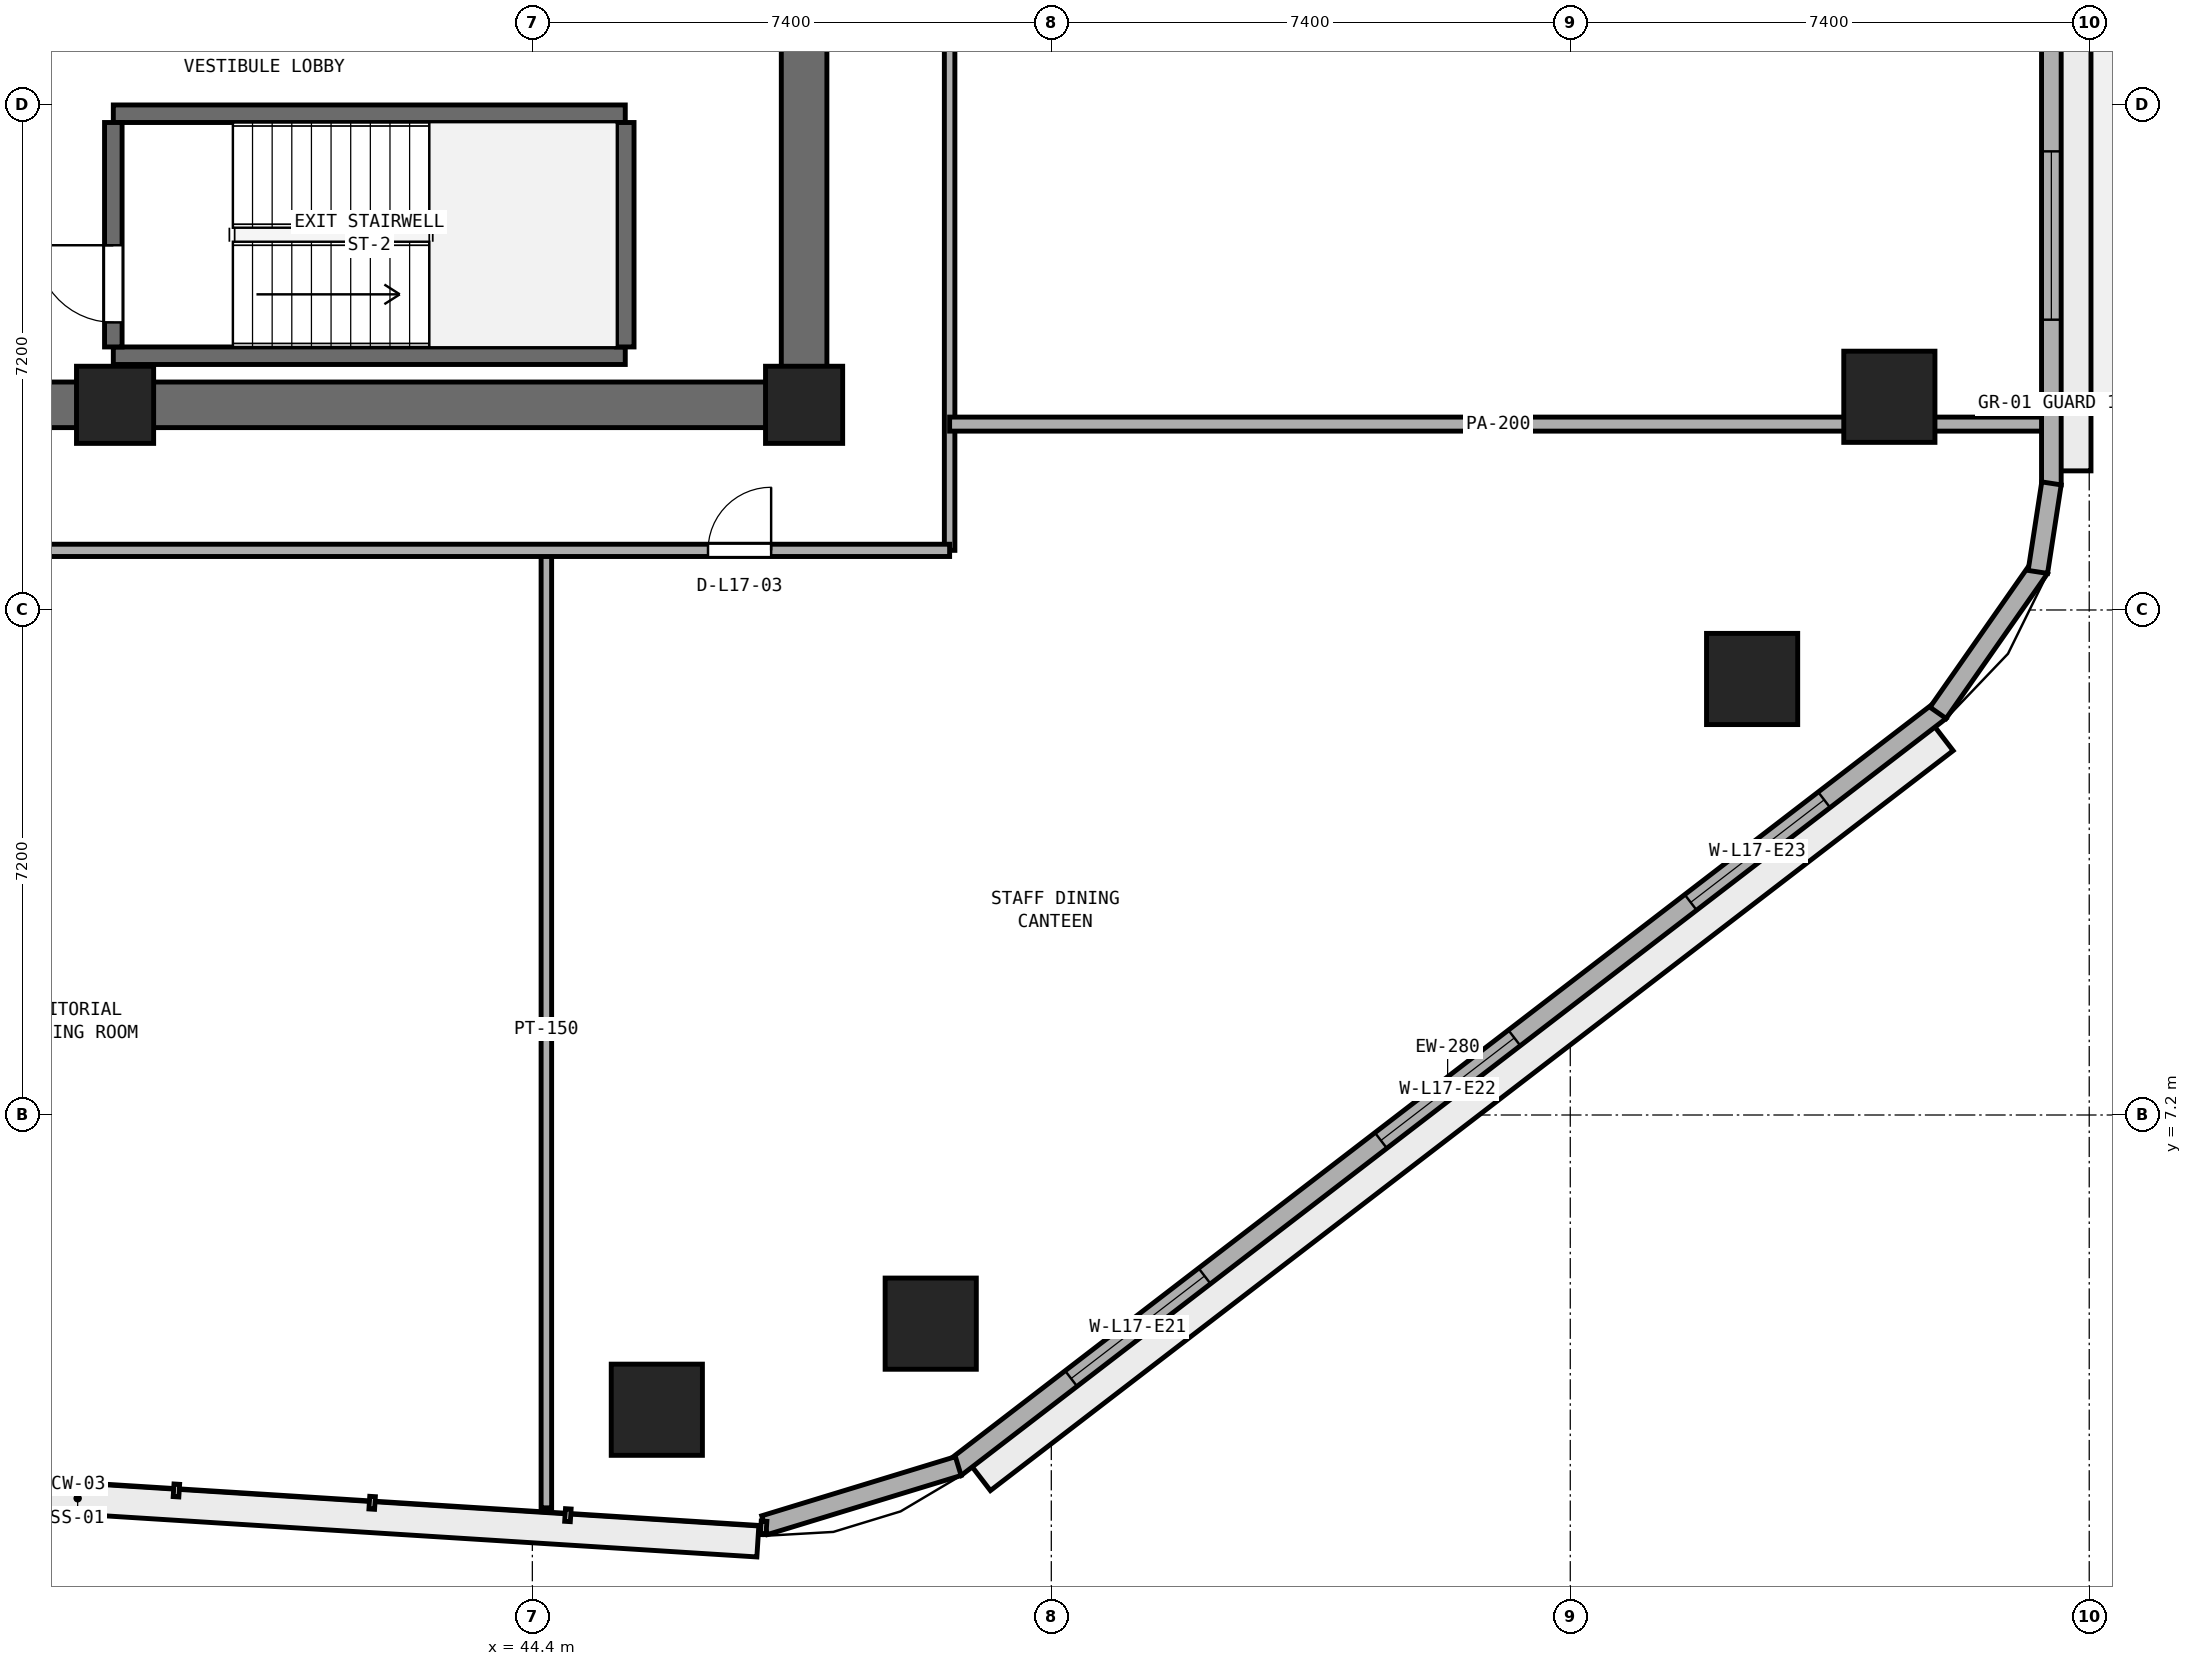
"""IFC4 building model, lengths in metres.
Left out: names, types, materials, properties, quantities, classifications, styles, units other than length and angle.
Written with IfcOpenShell. Run it as: python <this file> out.ifc"""

import sys

from ifc_helpers import new_model, si_unit, direction, frame, frame_2d, origin, origin_2d, place, context, subcontext, project, spatial, rectangle, extrude, element, fill, save


model = new_model("IFC4")
c1 = context("Model", 3, precision=1e-05, world=origin(), true_north=direction((0.0, 1.0)))
c2 = subcontext(c1, "Body", "Model", "MODEL_VIEW")
j1 = project(units=[si_unit("LENGTHUNIT", "METRE"), si_unit("PLANEANGLEUNIT", "RADIAN")], contexts=[c1])
p1 = place(None, origin())
s1 = spatial("IfcSite", under=j1, at=p1, CompositionType="ELEMENT")
p2 = place(p1, origin())
s2 = spatial("IfcBuilding", under=s1, at=p2, CompositionType="ELEMENT")
p3 = place(p2, frame((0.0, 0.0, 70.6)))
s3 = spatial("IfcBuildingStorey", under=s2, at=p3, CompositionType="ELEMENT", Elevation=70.6)
p4 = place(p3, frame((25.4, 17.325, 0.0), z_axis=(0.0, 0.0, 1.0), x_axis=(1.0, 0.0, 0.0)))
e1 = element("IfcWall", 1, at=p4, inside=s3, PredefinedType="SHEAR", context=c2, shape_type="SweptSolid", body=[
    extrude(rectangle(XDim=23.2, YDim=0.65, at=frame_2d((11.6, 0.0))), origin(), (0.0, 0.0, 1.0), 3.525),
])
p5 = place(p3, frame((48.275, 17.65, 0.0), z_axis=(0.0, 0.0, 1.0), x_axis=(0.0, 1.0, 0.0)))
e2 = element("IfcWall", 2, at=p5, inside=s3, PredefinedType="SHEAR", context=c2, shape_type="SweptSolid", body=[
    extrude(rectangle(XDim=15.1, YDim=0.65, at=frame_2d((7.55, 0.0))), origin(), (0.0, 0.0, 1.0), 3.525),
])
p6 = place(p5, frame((5.65, 0.0, 0.0)))
e3 = element("IfcOpeningElement", 3, at=p6, cuts=e2, PredefinedType="OPENING", context=c2, shape_type="SweptSolid", body=[
    extrude(rectangle(XDim=1.5, YDim=2.15, at=frame_2d((0.75, 1.075))), frame((0.0, 0.335, 0.0), z_axis=(0.0, -1.0, 0.0), x_axis=(1.0, 0.0, 0.0)), (0.0, 0.0, 1.0), 0.67),
])
for number, where, z_axis, x_axis in (
    (4, (38.45, 17.325, 0.0), (0.0, 0.0, 1.0), (1.0, 0.0, 0.0)),
    (5, (48.275, 17.325, 0.0), (0.0, 0.0, 1.0), (1.0, 0.0, 0.0)),
):
    element("IfcColumn", number, at=place(p3, frame(where, z_axis=z_axis, x_axis=x_axis)), inside=s3, PredefinedType="PILASTER", context=c2, shape_type="SweptSolid", body=[
        extrude(rectangle(XDim=1.1, YDim=1.1, at=origin_2d()), origin(), (0.0, 0.0, 1.0), 3.8),
    ])
for number, where, z_axis, x_axis in (
    (6, (46.175, 2.998, 0.0), (0.0, 0.0, 1.0), (1.0, 0.0, 0.0)),
    (7, (50.081, 4.225, 0.0), (0.0, 0.0, 1.0), (1.0, 0.0, 0.0)),
    (8, (61.793, 13.416, 0.0), (0.0, 0.0, 1.0), (1.0, 0.0, 0.0)),
    (9, (63.75, 17.44, 0.0), (0.0, 0.0, 1.0), (1.0, 0.0, 0.0)),
):
    element("IfcColumn", number, at=place(p3, frame(where, z_axis=z_axis, x_axis=x_axis)), inside=s3, PredefinedType="COLUMN", context=c2, shape_type="SweptSolid", body=[
        extrude(rectangle(XDim=1.3, YDim=1.3, at=origin_2d()), origin(), (0.0, 0.0, 1.0), 3.8),
    ])
for number, where, z_axis, x_axis in (
    (10, (38.425, 18.025, 0.0), (0.0, 0.0, 1.0), (1.0, 0.0, 0.0)),
    (11, (38.425, 21.475, 0.0), (0.0, 0.0, 1.0), (1.0, 0.0, 0.0)),
):
    element("IfcWall", number, at=place(p3, frame(where, z_axis=z_axis, x_axis=x_axis)), inside=s3, PredefinedType="SHEAR", context=c2, shape_type="SweptSolid", body=[
        extrude(rectangle(XDim=7.3, YDim=0.25, at=frame_2d((3.65, 0.0))), origin(), (0.0, 0.0, 1.0), 3.525),
    ])
p7 = place(p3, frame((38.425, 18.15, 0.0), z_axis=(0.0, 0.0, 1.0), x_axis=(0.0, 1.0, 0.0)))
e12 = element("IfcWall", 12, at=p7, inside=s3, PredefinedType="SHEAR", context=c2, shape_type="SweptSolid", body=[
    extrude(rectangle(XDim=3.2, YDim=0.25, at=frame_2d((1.6, 0.0))), origin(), (0.0, 0.0, 1.0), 3.525),
])
p8 = place(p7, frame((0.35, 0.0, 0.0)))
e13 = element("IfcOpeningElement", 13, at=p8, cuts=e12, PredefinedType="OPENING", context=c2, shape_type="SweptSolid", body=[
    extrude(rectangle(XDim=1.1, YDim=2.15, at=frame_2d((0.55, 1.075))), frame((0.0, 0.135, 0.0), z_axis=(0.0, -1.0, 0.0), x_axis=(1.0, 0.0, 0.0)), (0.0, 0.0, 1.0), 0.27),
])
p9 = place(p3, frame((45.725, 18.15, 0.0), z_axis=(0.0, 0.0, 1.0), x_axis=(0.0, 1.0, 0.0)))
e14 = element("IfcWall", 14, at=p9, inside=s3, PredefinedType="SHEAR", context=c2, shape_type="SweptSolid", body=[
    extrude(rectangle(XDim=3.2, YDim=0.25, at=frame_2d((1.6, 0.0))), origin(), (0.0, 0.0, 1.0), 3.525),
])
p10 = place(p3, frame((50.35, 15.25, 0.0), z_axis=(0.0, 0.0, 1.0), x_axis=(0.0, 1.0, 0.0)))
e15 = element("IfcWall", 15, at=p10, inside=s3, PredefinedType="PARTITIONING", context=c2, shape_type="SweptSolid", body=[
    extrude(rectangle(XDim=19.9, YDim=0.15, at=frame_2d((9.95, 0.0))), origin(), (0.0, 0.0, 1.0), 3.525),
])
p11 = place(p10, frame((7.825, 0.0, 0.0)))
e16 = element("IfcOpeningElement", 16, at=p11, cuts=e15, PredefinedType="OPENING", context=c2, shape_type="SweptSolid", body=[
    extrude(rectangle(XDim=0.9, YDim=2.1, at=frame_2d((0.45, 1.05))), frame((0.0, 0.085, 0.0), z_axis=(0.0, -1.0, 0.0), x_axis=(1.0, 0.0, 0.0)), (0.0, 0.0, 1.0), 0.17),
])
p12 = place(p10, frame((15.925, 0.0, 0.0)))
e17 = element("IfcOpeningElement", 17, at=p12, cuts=e15, PredefinedType="OPENING", context=c2, shape_type="SweptSolid", body=[
    extrude(rectangle(XDim=1.0, YDim=2.12, at=frame_2d((0.5, 1.06))), frame((0.0, 0.085, 0.0), z_axis=(0.0, -1.0, 0.0), x_axis=(1.0, 0.0, 0.0)), (0.0, 0.0, 1.0), 0.17),
])
p13 = place(p3, frame((44.6, 1.599, 0.0), z_axis=(0.0, 0.0, 1.0), x_axis=(0.0, 1.0, 0.0)))
e18 = element("IfcWall", 18, at=p13, inside=s3, PredefinedType="PARTITIONING", context=c2, shape_type="SweptSolid", body=[
    extrude(rectangle(XDim=13.651, YDim=0.15, at=frame_2d((6.825, 0.0))), origin(), (0.0, 0.0, 1.0), 3.525),
])
p14 = place(p3, frame((23.65, 15.25, 0.0), z_axis=(0.0, 0.0, 1.0), x_axis=(1.0, 0.0, 0.0)))
e19 = element("IfcWall", 19, at=p14, inside=s3, PredefinedType="PARTITIONING", context=c2, shape_type="SweptSolid", body=[
    extrude(rectangle(XDim=26.7, YDim=0.175, at=frame_2d((13.35, 0.0))), origin(), (0.0, 0.0, 1.0), 3.525),
])
p15 = place(p14, frame((10.145, 0.0, 0.0)))
e20 = element("IfcOpeningElement", 20, at=p15, cuts=e19, PredefinedType="OPENING", context=c2, shape_type="SweptSolid", body=[
    extrude(rectangle(XDim=0.9, YDim=2.1, at=frame_2d((0.45, 1.05))), frame((0.0, 0.097, 0.0), z_axis=(0.0, -1.0, 0.0), x_axis=(1.0, 0.0, 0.0)), (0.0, 0.0, 1.0), 0.195),
])
p16 = place(p14, frame((23.255, 0.0, 0.0)))
e21 = element("IfcOpeningElement", 21, at=p16, cuts=e19, PredefinedType="OPENING", context=c2, shape_type="SweptSolid", body=[
    extrude(rectangle(XDim=0.9, YDim=2.1, at=frame_2d((0.45, 1.05))), frame((0.0, 0.097, 0.0), z_axis=(0.0, -1.0, 0.0), x_axis=(1.0, 0.0, 0.0)), (0.0, 0.0, 1.0), 0.195),
])
p17 = place(p3, frame((50.35, 17.05, 0.0), z_axis=(0.0, 0.0, 1.0), x_axis=(1.0, 0.0, 0.0)))
e22 = element("IfcWall", 22, at=p17, inside=s3, PredefinedType="PARTITIONING", context=c2, shape_type="SweptSolid", body=[
    extrude(rectangle(XDim=15.645, YDim=0.2, at=frame_2d((7.823, 0.0))), origin(), (0.0, 0.0, 1.0), 3.525),
])
p18 = place(p3, frame((50.429, 2.172, 0.0), z_axis=(0.0, 0.0, 1.0), x_axis=(0.792937466367, 0.609303023488, 0.0)))
e23 = element("IfcWall", 23, at=p18, inside=s3, PredefinedType="STANDARD", context=c2, shape_type="SweptSolid", body=[
    extrude(rectangle(XDim=17.713, YDim=0.28, at=frame_2d((8.856, 0.0))), origin(), (0.0, 0.0, 1.0), 3.525),
])
p19 = place(p18, frame((2.085, 0.0, 0.9)))
e24 = element("IfcOpeningElement", 24, at=p19, cuts=e23, PredefinedType="OPENING", context=c2, shape_type="SweptSolid", body=[
    extrude(rectangle(XDim=2.4, YDim=1.75, at=frame_2d((1.2, 0.875))), frame((0.0, 0.15, 0.0), z_axis=(0.0, -1.0, 0.0), x_axis=(1.0, 0.0, 0.0)), (0.0, 0.0, 1.0), 0.3),
])
p20 = place(p18, frame((7.656, 0.0, 0.9)))
e25 = element("IfcOpeningElement", 25, at=p20, cuts=e23, PredefinedType="OPENING", context=c2, shape_type="SweptSolid", body=[
    extrude(rectangle(XDim=2.4, YDim=1.75, at=frame_2d((1.2, 0.875))), frame((0.0, 0.15, 0.0), z_axis=(0.0, -1.0, 0.0), x_axis=(1.0, 0.0, 0.0)), (0.0, 0.0, 1.0), 0.3),
])
p21 = place(p18, frame((13.227, 0.0, 0.9)))
e26 = element("IfcOpeningElement", 26, at=p21, cuts=e23, PredefinedType="OPENING", context=c2, shape_type="SweptSolid", body=[
    extrude(rectangle(XDim=2.4, YDim=1.75, at=frame_2d((1.2, 0.875))), frame((0.0, 0.15, 0.0), z_axis=(0.0, -1.0, 0.0), x_axis=(1.0, 0.0, 0.0)), (0.0, 0.0, 1.0), 0.3),
])
p22 = place(p3, frame((66.06, 16.183, 0.0), z_axis=(0.0, 0.0, 1.0), x_axis=(0.0, 1.0, 0.0)))
e27 = element("IfcWall", 27, at=p22, inside=s3, PredefinedType="STANDARD", context=c2, shape_type="SweptSolid", body=[
    extrude(rectangle(XDim=19.331, YDim=0.28, at=frame_2d((9.666, 0.0))), origin(), (0.0, 0.0, 1.0), 3.525),
])
p23 = place(p22, frame((9.115, 0.0, 0.0)))
e28 = element("IfcOpeningElement", 28, at=p23, cuts=e27, PredefinedType="OPENING", context=c2, shape_type="SweptSolid", body=[
    extrude(rectangle(XDim=1.1, YDim=2.2, at=frame_2d((0.55, 1.1))), frame((0.0, 0.15, 0.0), z_axis=(0.0, -1.0, 0.0), x_axis=(1.0, 0.0, 0.0)), (0.0, 0.0, 1.0), 0.3),
])
p24 = place(p22, frame((2.355, 0.0, 0.9)))
e29 = element("IfcOpeningElement", 29, at=p24, cuts=e27, PredefinedType="OPENING", context=c2, shape_type="SweptSolid", body=[
    extrude(rectangle(XDim=2.4, YDim=1.75, at=frame_2d((1.2, 0.875))), frame((0.0, 0.15, 0.0), z_axis=(0.0, -1.0, 0.0), x_axis=(1.0, 0.0, 0.0)), (0.0, 0.0, 1.0), 0.3),
])
p25 = place(p22, frame((14.326, 0.0, 0.9)))
e30 = element("IfcOpeningElement", 30, at=p25, cuts=e27, PredefinedType="OPENING", context=c2, shape_type="SweptSolid", body=[
    extrude(rectangle(XDim=2.4, YDim=1.75, at=frame_2d((1.2, 0.875))), frame((0.0, 0.15, 0.0), z_axis=(0.0, -1.0, 0.0), x_axis=(1.0, 0.0, 0.0)), (0.0, 0.0, 1.0), 0.3),
])
p26 = place(p3, frame((47.712, 1.352, 0.0), z_axis=(0.0, 0.0, 1.0), x_axis=(0.956465727645, 0.291844670743, 0.0)))
e31 = element("IfcWall", 31, at=p26, inside=s3, PredefinedType="STANDARD", context=c2, shape_type="SweptSolid", body=[
    extrude(rectangle(XDim=2.887, YDim=0.28, at=frame_2d((1.443, 0.0))), origin(), (0.0, 0.0, 1.0), 3.525),
])
p27 = place(p3, frame((64.444, 12.933, 0.0), z_axis=(0.0, 0.0, 1.0), x_axis=(0.573176686443, 0.819431806875, 0.0)))
e32 = element("IfcWall", 32, at=p27, inside=s3, PredefinedType="STANDARD", context=c2, shape_type="SweptSolid", body=[
    extrude(rectangle(XDim=2.524, YDim=0.28, at=frame_2d((1.262, 0.0))), origin(), (0.0, 0.0, 1.0), 3.525),
])
p28 = place(p3, frame((65.867, 14.943, 0.0), z_axis=(0.0, 0.0, 1.0), x_axis=(0.152014078361, 0.988378328364, 0.0)))
e33 = element("IfcWall", 33, at=p28, inside=s3, PredefinedType="STANDARD", context=c2, shape_type="SweptSolid", body=[
    extrude(rectangle(XDim=1.277, YDim=0.28, at=frame_2d((0.638, 0.0))), origin(), (0.0, 0.0, 1.0), 3.525),
])
p29 = place(p8, origin())
e34 = element("IfcDoor", 34, at=p29, inside=s3, OperationType="SINGLE_SWING_RIGHT", PredefinedType="DOOR", context=c2, shape_type="SweptSolid", body=[
    extrude(rectangle(XDim=1.1, YDim=2.15, at=frame_2d((0.55, 1.075))), frame((0.0, 0.025, 0.0), z_axis=(0.0, -1.0, 0.0), x_axis=(1.0, 0.0, 0.0)), (0.0, 0.0, 1.0), 0.05),
])
fill(e13, e34)
p30 = place(p16, origin())
e35 = element("IfcDoor", 35, at=p30, inside=s3, OperationType="SINGLE_SWING_RIGHT", PredefinedType="DOOR", context=c2, shape_type="SweptSolid", body=[
    extrude(rectangle(XDim=0.9, YDim=2.1, at=frame_2d((0.45, 1.05))), frame((0.0, 0.025, 0.0), z_axis=(0.0, -1.0, 0.0), x_axis=(1.0, 0.0, 0.0)), (0.0, 0.0, 1.0), 0.05),
])
fill(e21, e35)
p31 = place(p19, origin())
e36 = element("IfcWindow", 36, at=p31, inside=s3, PartitioningType="SINGLE_PANEL", PredefinedType="WINDOW", context=c2, shape_type="SweptSolid", body=[
    extrude(rectangle(XDim=2.4, YDim=1.75, at=frame_2d((1.2, 0.875))), frame((0.0, 0.03, 0.0), z_axis=(0.0, -1.0, 0.0), x_axis=(1.0, 0.0, 0.0)), (0.0, 0.0, 1.0), 0.06),
])
fill(e24, e36)
p32 = place(p20, origin())
e37 = element("IfcWindow", 37, at=p32, inside=s3, PartitioningType="SINGLE_PANEL", PredefinedType="WINDOW", context=c2, shape_type="SweptSolid", body=[
    extrude(rectangle(XDim=2.4, YDim=1.75, at=frame_2d((1.2, 0.875))), frame((0.0, 0.03, 0.0), z_axis=(0.0, -1.0, 0.0), x_axis=(1.0, 0.0, 0.0)), (0.0, 0.0, 1.0), 0.06),
])
fill(e25, e37)
p33 = place(p21, origin())
e38 = element("IfcWindow", 38, at=p33, inside=s3, PartitioningType="SINGLE_PANEL", PredefinedType="WINDOW", context=c2, shape_type="SweptSolid", body=[
    extrude(rectangle(XDim=2.4, YDim=1.75, at=frame_2d((1.2, 0.875))), frame((0.0, 0.03, 0.0), z_axis=(0.0, -1.0, 0.0), x_axis=(1.0, 0.0, 0.0)), (0.0, 0.0, 1.0), 0.06),
])
fill(e26, e38)
p34 = place(p24, origin())
e39 = element("IfcWindow", 39, at=p34, inside=s3, PartitioningType="SINGLE_PANEL", PredefinedType="WINDOW", context=c2, shape_type="SweptSolid", body=[
    extrude(rectangle(XDim=2.4, YDim=1.75, at=frame_2d((1.2, 0.875))), frame((0.0, 0.03, 0.0), z_axis=(0.0, -1.0, 0.0), x_axis=(1.0, 0.0, 0.0)), (0.0, 0.0, 1.0), 0.06),
])
fill(e29, e39)
save(model, sys.argv[1])
